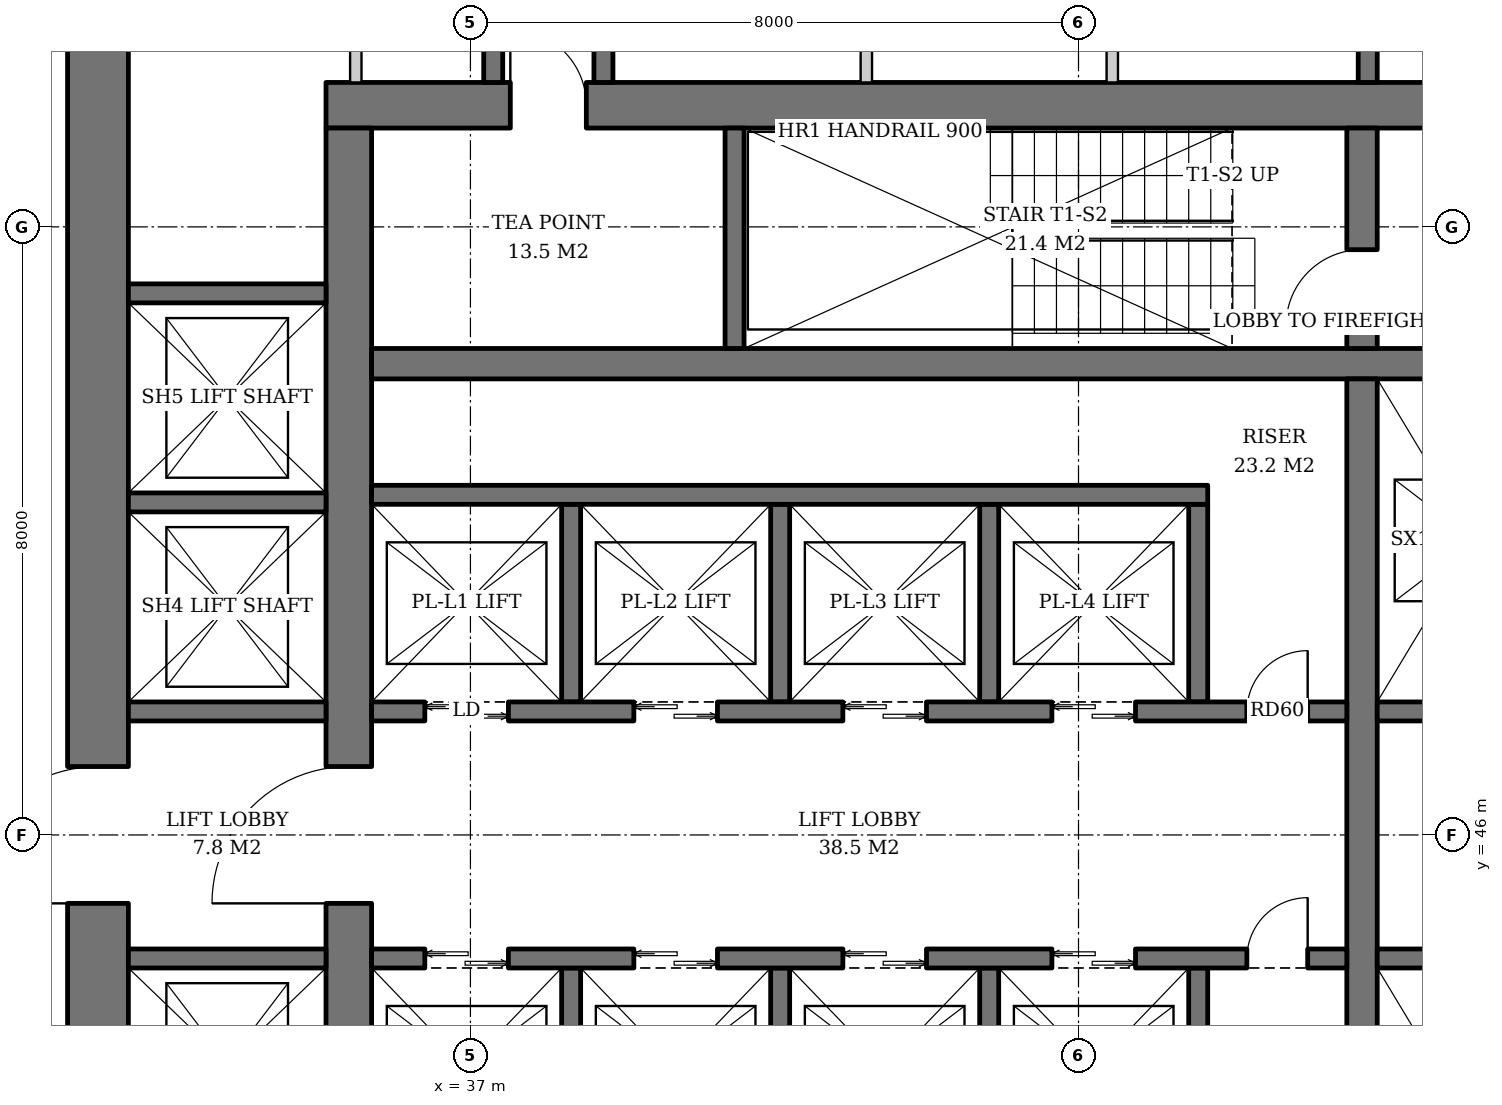
"""IFC4 building model, lengths in metres.
Left out: names, types, materials, properties, quantities, classifications, styles, units other than length and angle.
Written with IfcOpenShell. Run it as: python <this file> out.ifc"""

import sys

from ifc_helpers import new_model, si_unit, direction, frame, frame_2d, origin, place, context, subcontext, project, spatial, rectangle, extrude, element, fill, save


model = new_model("IFC4")
c1 = context("Model", 3, precision=1e-05, world=origin(), true_north=direction((0.0, 1.0)))
c2 = subcontext(c1, "Body", "Model", "MODEL_VIEW")
j1 = project(units=[si_unit("LENGTHUNIT", "METRE"), si_unit("PLANEANGLEUNIT", "RADIAN")], contexts=[c1])
p1 = place(None, origin())
s1 = spatial("IfcSite", under=j1, at=p1, CompositionType="ELEMENT")
p2 = place(p1, origin())
s2 = spatial("IfcBuilding", under=s1, at=p2, CompositionType="ELEMENT")
p3 = place(p2, frame((0.0, 0.0, 51.4)))
s3 = spatial("IfcBuildingStorey", under=s2, at=p3, CompositionType="ELEMENT", Elevation=51.4)
p4 = place(p3, frame((35.1, 55.6, 0.0), z_axis=(0.0, 0.0, 1.0), x_axis=(1.0, 0.0, 0.0)))
e1 = element("IfcWall", 1, at=p4, inside=s3, PredefinedType="SHEAR", context=c2, shape_type="SweptSolid", body=[
    extrude(rectangle(XDim=19.8, YDim=0.6, at=frame_2d((9.9, 0.0))), origin(), (0.0, 0.0, 1.0), 3.8),
])
p5 = place(p4, frame((14.54, 0.0, 0.0)))
e2 = element("IfcOpeningElement", 2, at=p5, cuts=e1, PredefinedType="OPENING", context=c2, shape_type="SweptSolid", body=[
    extrude(rectangle(XDim=1.0, YDim=2.1, at=frame_2d((0.5, 1.05))), frame((0.0, 0.31, 0.0), z_axis=(0.0, -1.0, 0.0), x_axis=(1.0, 0.0, 0.0)), (0.0, 0.0, 1.0), 0.62),
])
p6 = place(p4, frame((2.425, 0.0, 0.0)))
e3 = element("IfcOpeningElement", 3, at=p6, cuts=e1, PredefinedType="OPENING", context=c2, shape_type="SweptSolid", body=[
    extrude(rectangle(XDim=1.0, YDim=2.1, at=frame_2d((0.5, 1.05))), frame((0.0, 0.31, 0.0), z_axis=(0.0, -1.0, 0.0), x_axis=(1.0, 0.0, 0.0)), (0.0, 0.0, 1.0), 0.62),
])
p7 = place(p3, frame((35.4, 36.7, 0.0), z_axis=(0.0, 0.0, 1.0), x_axis=(0.0, 1.0, 0.0)))
e4 = element("IfcWall", 4, at=p7, inside=s3, PredefinedType="SHEAR", context=c2, shape_type="SweptSolid", body=[
    extrude(rectangle(XDim=18.6, YDim=0.6, at=frame_2d((9.3, 0.0))), origin(), (0.0, 0.0, 1.0), 3.8),
])
p8 = place(p7, frame((8.4, 0.0, 0.0)))
e5 = element("IfcOpeningElement", 5, at=p8, cuts=e4, PredefinedType="OPENING", context=c2, shape_type="SweptSolid", body=[
    extrude(rectangle(XDim=1.8, YDim=2.4, at=frame_2d((0.9, 1.2))), frame((0.0, 0.31, 0.0), z_axis=(0.0, -1.0, 0.0), x_axis=(1.0, 0.0, 0.0)), (0.0, 0.0, 1.0), 0.62),
])
p9 = place(p3, frame((32.1, 33.5, 0.0), z_axis=(0.0, 0.0, 1.0), x_axis=(0.0, 1.0, 0.0)))
e6 = element("IfcWall", 6, at=p9, inside=s3, PredefinedType="SHEAR", context=c2, shape_type="SweptSolid", body=[
    extrude(rectangle(XDim=25.0, YDim=0.8, at=frame_2d((12.5, 0.0))), origin(), (0.0, 0.0, 1.0), 3.8),
])
p10 = place(p9, frame((11.6, 0.0, 0.0)))
e7 = element("IfcOpeningElement", 7, at=p10, cuts=e6, PredefinedType="OPENING", context=c2, shape_type="SweptSolid", body=[
    extrude(rectangle(XDim=1.8, YDim=2.4, at=frame_2d((0.9, 1.2))), frame((0.0, 0.41, 0.0), z_axis=(0.0, -1.0, 0.0), x_axis=(1.0, 0.0, 0.0)), (0.0, 0.0, 1.0), 0.82),
])
p11 = place(p3, frame((35.7, 52.2, 0.0), z_axis=(0.0, 0.0, 1.0), x_axis=(1.0, 0.0, 0.0)))
e8 = element("IfcWall", 8, at=p11, inside=s3, PredefinedType="SHEAR", context=c2, shape_type="SweptSolid", body=[
    extrude(rectangle(XDim=18.6, YDim=0.4, at=frame_2d((9.3, 0.0))), origin(), (0.0, 0.0, 1.0), 3.8),
])
p12 = place(p3, frame((48.73, 40.0, 0.0), z_axis=(0.0, 0.0, 1.0), x_axis=(0.0, 1.0, 0.0)))
e9 = element("IfcWall", 9, at=p12, inside=s3, PredefinedType="SHEAR", context=c2, shape_type="SweptSolid", body=[
    extrude(rectangle(XDim=12.0, YDim=0.4, at=frame_2d((6.0, 0.0))), origin(), (0.0, 0.0, 1.0), 3.8),
])
p13 = place(p3, frame((48.73, 52.4, 0.0), z_axis=(0.0, 0.0, 1.0), x_axis=(0.0, 1.0, 0.0)))
e10 = element("IfcWall", 10, at=p13, inside=s3, PredefinedType="SHEAR", context=c2, shape_type="SweptSolid", body=[
    extrude(rectangle(XDim=2.9, YDim=0.4, at=frame_2d((1.45, 0.0))), origin(), (0.0, 0.0, 1.0), 3.8),
])
p14 = place(p13, frame((0.3, 0.0, 0.0)))
e11 = element("IfcOpeningElement", 11, at=p14, cuts=e10, PredefinedType="OPENING", context=c2, shape_type="SweptSolid", body=[
    extrude(rectangle(XDim=1.0, YDim=2.1, at=frame_2d((0.5, 1.05))), frame((0.0, 0.21, 0.0), z_axis=(0.0, -1.0, 0.0), x_axis=(1.0, 0.0, 0.0)), (0.0, 0.0, 1.0), 0.42),
])
p15 = place(p3, frame((40.475, 52.4, 0.0), z_axis=(0.0, 0.0, 1.0), x_axis=(0.0, 1.0, 0.0)))
e12 = element("IfcWall", 12, at=p15, inside=s3, PredefinedType="SHEAR", context=c2, shape_type="SweptSolid", body=[
    extrude(rectangle(XDim=2.9, YDim=0.25, at=frame_2d((1.45, 0.0))), origin(), (0.0, 0.0, 1.0), 3.8),
])
for number, where, z_axis, x_axis in (
    (13, (38.325, 47.75, 0.0), (0.0, 0.0, 1.0), (0.0, 1.0, 0.0)),
    (14, (41.075, 47.75, 0.0), (0.0, 0.0, 1.0), (0.0, 1.0, 0.0)),
    (15, (43.825, 47.75, 0.0), (0.0, 0.0, 1.0), (0.0, 1.0, 0.0)),
    (16, (46.575, 47.75, 0.0), (0.0, 0.0, 1.0), (0.0, 1.0, 0.0)),
):
    element("IfcWall", number, at=place(p3, frame(where, z_axis=z_axis, x_axis=x_axis)), inside=s3, PredefinedType="SHEAR", context=c2, shape_type="SweptSolid", body=[
        extrude(rectangle(XDim=2.6, YDim=0.25, at=frame_2d((1.3, 0.0))), origin(), (0.0, 0.0, 1.0), 3.8),
    ])
p16 = place(p3, frame((35.7, 50.475, 0.0), z_axis=(0.0, 0.0, 1.0), x_axis=(1.0, 0.0, 0.0)))
e17 = element("IfcWall", 17, at=p16, inside=s3, PredefinedType="SHEAR", context=c2, shape_type="SweptSolid", body=[
    extrude(rectangle(XDim=11.0, YDim=0.25, at=frame_2d((5.5, 0.0))), origin(), (0.0, 0.0, 1.0), 3.8),
])
p17 = place(p3, frame((35.7, 47.625, 0.0), z_axis=(0.0, 0.0, 1.0), x_axis=(1.0, 0.0, 0.0)))
e18 = element("IfcWall", 18, at=p17, inside=s3, PredefinedType="SHEAR", context=c2, shape_type="SweptSolid", body=[
    extrude(rectangle(XDim=12.83, YDim=0.25, at=frame_2d((6.415, 0.0))), origin(), (0.0, 0.0, 1.0), 3.8),
])
p18 = place(p17, frame((0.7, 0.0, 0.0)))
e19 = element("IfcOpeningElement", 19, at=p18, cuts=e18, PredefinedType="OPENING", context=c2, shape_type="SweptSolid", body=[
    extrude(rectangle(XDim=1.1, YDim=2.2, at=frame_2d((0.55, 1.1))), frame((0.0, 0.135, 0.0), z_axis=(0.0, -1.0, 0.0), x_axis=(1.0, 0.0, 0.0)), (0.0, 0.0, 1.0), 0.27),
])
p19 = place(p17, frame((3.45, 0.0, 0.0)))
e20 = element("IfcOpeningElement", 20, at=p19, cuts=e18, PredefinedType="OPENING", context=c2, shape_type="SweptSolid", body=[
    extrude(rectangle(XDim=1.1, YDim=2.2, at=frame_2d((0.55, 1.1))), frame((0.0, 0.135, 0.0), z_axis=(0.0, -1.0, 0.0), x_axis=(1.0, 0.0, 0.0)), (0.0, 0.0, 1.0), 0.27),
])
p20 = place(p17, frame((6.2, 0.0, 0.0)))
e21 = element("IfcOpeningElement", 21, at=p20, cuts=e18, PredefinedType="OPENING", context=c2, shape_type="SweptSolid", body=[
    extrude(rectangle(XDim=1.1, YDim=2.2, at=frame_2d((0.55, 1.1))), frame((0.0, 0.135, 0.0), z_axis=(0.0, -1.0, 0.0), x_axis=(1.0, 0.0, 0.0)), (0.0, 0.0, 1.0), 0.27),
])
p21 = place(p17, frame((8.95, 0.0, 0.0)))
e22 = element("IfcOpeningElement", 22, at=p21, cuts=e18, PredefinedType="OPENING", context=c2, shape_type="SweptSolid", body=[
    extrude(rectangle(XDim=1.1, YDim=2.2, at=frame_2d((0.55, 1.1))), frame((0.0, 0.135, 0.0), z_axis=(0.0, -1.0, 0.0), x_axis=(1.0, 0.0, 0.0)), (0.0, 0.0, 1.0), 0.27),
])
p22 = place(p17, frame((11.515, 0.0, 0.0)))
e23 = element("IfcOpeningElement", 23, at=p22, cuts=e18, PredefinedType="OPENING", context=c2, shape_type="SweptSolid", body=[
    extrude(rectangle(XDim=0.8, YDim=2.0, at=frame_2d((0.4, 1.0))), frame((0.0, 0.135, 0.0), z_axis=(0.0, -1.0, 0.0), x_axis=(1.0, 0.0, 0.0)), (0.0, 0.0, 1.0), 0.27),
])
for number, where, z_axis, x_axis in (
    (24, (38.325, 44.25, 0.0), (0.0, 0.0, 1.0), (0.0, -1.0, 0.0)),
    (25, (41.075, 44.25, 0.0), (0.0, 0.0, 1.0), (0.0, -1.0, 0.0)),
    (26, (43.825, 44.25, 0.0), (0.0, 0.0, 1.0), (0.0, -1.0, 0.0)),
    (27, (46.575, 44.25, 0.0), (0.0, 0.0, 1.0), (0.0, -1.0, 0.0)),
):
    element("IfcWall", number, at=place(p3, frame(where, z_axis=z_axis, x_axis=x_axis)), inside=s3, PredefinedType="SHEAR", context=c2, shape_type="SweptSolid", body=[
        extrude(rectangle(XDim=2.6, YDim=0.25, at=frame_2d((1.3, 0.0))), origin(), (0.0, 0.0, 1.0), 3.8),
    ])
p23 = place(p3, frame((35.7, 44.375, 0.0), z_axis=(0.0, 0.0, 1.0), x_axis=(1.0, 0.0, 0.0)))
e28 = element("IfcWall", 28, at=p23, inside=s3, PredefinedType="SHEAR", context=c2, shape_type="SweptSolid", body=[
    extrude(rectangle(XDim=12.83, YDim=0.25, at=frame_2d((6.415, 0.0))), origin(), (0.0, 0.0, 1.0), 3.8),
])
p24 = place(p23, frame((0.7, 0.0, 0.0)))
e29 = element("IfcOpeningElement", 29, at=p24, cuts=e28, PredefinedType="OPENING", context=c2, shape_type="SweptSolid", body=[
    extrude(rectangle(XDim=1.1, YDim=2.2, at=frame_2d((0.55, 1.1))), frame((0.0, 0.135, 0.0), z_axis=(0.0, -1.0, 0.0), x_axis=(1.0, 0.0, 0.0)), (0.0, 0.0, 1.0), 0.27),
])
p25 = place(p23, frame((3.45, 0.0, 0.0)))
e30 = element("IfcOpeningElement", 30, at=p25, cuts=e28, PredefinedType="OPENING", context=c2, shape_type="SweptSolid", body=[
    extrude(rectangle(XDim=1.1, YDim=2.2, at=frame_2d((0.55, 1.1))), frame((0.0, 0.135, 0.0), z_axis=(0.0, -1.0, 0.0), x_axis=(1.0, 0.0, 0.0)), (0.0, 0.0, 1.0), 0.27),
])
p26 = place(p23, frame((6.2, 0.0, 0.0)))
e31 = element("IfcOpeningElement", 31, at=p26, cuts=e28, PredefinedType="OPENING", context=c2, shape_type="SweptSolid", body=[
    extrude(rectangle(XDim=1.1, YDim=2.2, at=frame_2d((0.55, 1.1))), frame((0.0, 0.135, 0.0), z_axis=(0.0, -1.0, 0.0), x_axis=(1.0, 0.0, 0.0)), (0.0, 0.0, 1.0), 0.27),
])
p27 = place(p23, frame((8.95, 0.0, 0.0)))
e32 = element("IfcOpeningElement", 32, at=p27, cuts=e28, PredefinedType="OPENING", context=c2, shape_type="SweptSolid", body=[
    extrude(rectangle(XDim=1.1, YDim=2.2, at=frame_2d((0.55, 1.1))), frame((0.0, 0.135, 0.0), z_axis=(0.0, -1.0, 0.0), x_axis=(1.0, 0.0, 0.0)), (0.0, 0.0, 1.0), 0.27),
])
p28 = place(p23, frame((11.515, 0.0, 0.0)))
e33 = element("IfcOpeningElement", 33, at=p28, cuts=e28, PredefinedType="OPENING", context=c2, shape_type="SweptSolid", body=[
    extrude(rectangle(XDim=0.8, YDim=2.0, at=frame_2d((0.4, 1.0))), frame((0.0, 0.135, 0.0), z_axis=(0.0, -1.0, 0.0), x_axis=(1.0, 0.0, 0.0)), (0.0, 0.0, 1.0), 0.27),
])
for number, where, z_axis, x_axis in (
    (34, (48.93, 47.625, 0.0), (0.0, 0.0, 1.0), (1.0, 0.0, 0.0)),
    (35, (48.93, 44.375, 0.0), (0.0, 0.0, 1.0), (1.0, 0.0, 0.0)),
):
    element("IfcWall", number, at=place(p3, frame(where, z_axis=z_axis, x_axis=x_axis)), inside=s3, PredefinedType="SHEAR", context=c2, shape_type="SweptSolid", body=[
        extrude(rectangle(XDim=5.37, YDim=0.25, at=frame_2d((2.685, 0.0))), origin(), (0.0, 0.0, 1.0), 3.8),
    ])
for number, where, z_axis, x_axis in (
    (36, (32.5, 44.375, 0.0), (0.0, 0.0, 1.0), (1.0, 0.0, 0.0)),
    (37, (32.5, 47.625, 0.0), (0.0, 0.0, 1.0), (1.0, 0.0, 0.0)),
    (38, (32.5, 50.375, 0.0), (0.0, 0.0, 1.0), (1.0, 0.0, 0.0)),
    (39, (32.5, 53.125, 0.0), (0.0, 0.0, 1.0), (1.0, 0.0, 0.0)),
):
    element("IfcWall", number, at=place(p3, frame(where, z_axis=z_axis, x_axis=x_axis)), inside=s3, PredefinedType="SHEAR", context=c2, shape_type="SweptSolid", body=[
        extrude(rectangle(XDim=2.6, YDim=0.25, at=frame_2d((1.3, 0.0))), origin(), (0.0, 0.0, 1.0), 3.8),
    ])
for number, where, z_axis, x_axis in (
    (40, (48.805, 55.9, 0.0), (0.0, 0.0, 1.0), (0.0, 1.0, 0.0)),
    (41, (37.3, 55.9, 0.0), (0.0, 0.0, 1.0), (0.0, 1.0, 0.0)),
    (42, (38.75, 55.9, 0.0), (0.0, 0.0, 1.0), (0.0, 1.0, 0.0)),
):
    element("IfcWall", number, at=place(p3, frame(where, z_axis=z_axis, x_axis=x_axis)), inside=s3, PredefinedType="SOLIDWALL", context=c2, shape_type="SweptSolid", body=[
        extrude(rectangle(XDim=2.6, YDim=0.25, at=frame_2d((1.3, 0.0))), origin(), (0.0, 0.0, 1.0), 3.62),
    ])
for number, where, z_axis, x_axis in (
    (43, (35.492, 55.9, 0.0), (0.0, 0.0, 1.0), (0.0, 1.0, 0.0)),
    (44, (42.209, 55.9, 0.0), (0.0, 0.0, 1.0), (0.0, 1.0, 0.0)),
    (45, (45.444, 55.9, 0.0), (0.0, 0.0, 1.0), (0.0, 1.0, 0.0)),
):
    element("IfcWall", number, at=place(p3, frame(where, z_axis=z_axis, x_axis=x_axis)), inside=s3, PredefinedType="SOLIDWALL", context=c2, shape_type="SweptSolid", body=[
        extrude(rectangle(XDim=2.6, YDim=0.15, at=frame_2d((1.3, 0.0))), origin(), (0.0, 0.0, 1.0), 3.62),
    ])
p29 = place(p18, origin())
e46 = element("IfcDoor", 46, at=p29, inside=s3, OperationType="DOUBLE_DOOR_SLIDING", PredefinedType="DOOR", context=c2, shape_type="SweptSolid", body=[
    extrude(rectangle(XDim=1.1, YDim=2.2, at=frame_2d((0.55, 1.1))), frame((0.0, 0.025, 0.0), z_axis=(0.0, -1.0, 0.0), x_axis=(1.0, 0.0, 0.0)), (0.0, 0.0, 1.0), 0.05),
])
fill(e19, e46)
p30 = place(p19, origin())
e47 = element("IfcDoor", 47, at=p30, inside=s3, OperationType="DOUBLE_DOOR_SLIDING", PredefinedType="DOOR", context=c2, shape_type="SweptSolid", body=[
    extrude(rectangle(XDim=1.1, YDim=2.2, at=frame_2d((0.55, 1.1))), frame((0.0, 0.025, 0.0), z_axis=(0.0, -1.0, 0.0), x_axis=(1.0, 0.0, 0.0)), (0.0, 0.0, 1.0), 0.05),
])
fill(e20, e47)
p31 = place(p20, origin())
e48 = element("IfcDoor", 48, at=p31, inside=s3, OperationType="DOUBLE_DOOR_SLIDING", PredefinedType="DOOR", context=c2, shape_type="SweptSolid", body=[
    extrude(rectangle(XDim=1.1, YDim=2.2, at=frame_2d((0.55, 1.1))), frame((0.0, 0.025, 0.0), z_axis=(0.0, -1.0, 0.0), x_axis=(1.0, 0.0, 0.0)), (0.0, 0.0, 1.0), 0.05),
])
fill(e21, e48)
p32 = place(p21, origin())
e49 = element("IfcDoor", 49, at=p32, inside=s3, OperationType="DOUBLE_DOOR_SLIDING", PredefinedType="DOOR", context=c2, shape_type="SweptSolid", body=[
    extrude(rectangle(XDim=1.1, YDim=2.2, at=frame_2d((0.55, 1.1))), frame((0.0, 0.025, 0.0), z_axis=(0.0, -1.0, 0.0), x_axis=(1.0, 0.0, 0.0)), (0.0, 0.0, 1.0), 0.05),
])
fill(e22, e49)
p33 = place(p22, origin())
e50 = element("IfcDoor", 50, at=p33, inside=s3, OperationType="SINGLE_SWING_RIGHT", PredefinedType="DOOR", context=c2, shape_type="SweptSolid", body=[
    extrude(rectangle(XDim=0.8, YDim=2.0, at=frame_2d((0.4, 1.0))), frame((0.0, 0.025, 0.0), z_axis=(0.0, -1.0, 0.0), x_axis=(1.0, 0.0, 0.0)), (0.0, 0.0, 1.0), 0.05),
])
fill(e23, e50)
p34 = place(p24, origin())
e51 = element("IfcDoor", 51, at=p34, inside=s3, OperationType="DOUBLE_DOOR_SLIDING", PredefinedType="DOOR", context=c2, shape_type="SweptSolid", body=[
    extrude(rectangle(XDim=1.1, YDim=2.2, at=frame_2d((0.55, 1.1))), frame((0.0, 0.025, 0.0), z_axis=(0.0, -1.0, 0.0), x_axis=(1.0, 0.0, 0.0)), (0.0, 0.0, 1.0), 0.05),
])
fill(e29, e51)
p35 = place(p25, origin())
e52 = element("IfcDoor", 52, at=p35, inside=s3, OperationType="DOUBLE_DOOR_SLIDING", PredefinedType="DOOR", context=c2, shape_type="SweptSolid", body=[
    extrude(rectangle(XDim=1.1, YDim=2.2, at=frame_2d((0.55, 1.1))), frame((0.0, 0.025, 0.0), z_axis=(0.0, -1.0, 0.0), x_axis=(1.0, 0.0, 0.0)), (0.0, 0.0, 1.0), 0.05),
])
fill(e30, e52)
p36 = place(p26, origin())
e53 = element("IfcDoor", 53, at=p36, inside=s3, OperationType="DOUBLE_DOOR_SLIDING", PredefinedType="DOOR", context=c2, shape_type="SweptSolid", body=[
    extrude(rectangle(XDim=1.1, YDim=2.2, at=frame_2d((0.55, 1.1))), frame((0.0, 0.025, 0.0), z_axis=(0.0, -1.0, 0.0), x_axis=(1.0, 0.0, 0.0)), (0.0, 0.0, 1.0), 0.05),
])
fill(e31, e53)
p37 = place(p27, origin())
e54 = element("IfcDoor", 54, at=p37, inside=s3, OperationType="DOUBLE_DOOR_SLIDING", PredefinedType="DOOR", context=c2, shape_type="SweptSolid", body=[
    extrude(rectangle(XDim=1.1, YDim=2.2, at=frame_2d((0.55, 1.1))), frame((0.0, 0.025, 0.0), z_axis=(0.0, -1.0, 0.0), x_axis=(1.0, 0.0, 0.0)), (0.0, 0.0, 1.0), 0.05),
])
fill(e32, e54)
p38 = place(p28, origin())
e55 = element("IfcDoor", 55, at=p38, inside=s3, OperationType="SINGLE_SWING_RIGHT", PredefinedType="DOOR", context=c2, shape_type="SweptSolid", body=[
    extrude(rectangle(XDim=0.8, YDim=2.0, at=frame_2d((0.4, 1.0))), frame((0.0, 0.025, 0.0), z_axis=(0.0, -1.0, 0.0), x_axis=(1.0, 0.0, 0.0)), (0.0, 0.0, 1.0), 0.05),
])
fill(e33, e55)
p39 = place(p14, origin())
e56 = element("IfcDoor", 56, at=p39, inside=s3, OperationType="SINGLE_SWING_LEFT", PredefinedType="DOOR", context=c2, shape_type="SweptSolid", body=[
    extrude(rectangle(XDim=1.0, YDim=2.1, at=frame_2d((0.5, 1.05))), frame((0.0, 0.025, 0.0), z_axis=(0.0, -1.0, 0.0), x_axis=(1.0, 0.0, 0.0)), (0.0, 0.0, 1.0), 0.05),
])
fill(e11, e56)
p40 = place(p8, origin())
e57 = element("IfcDoor", 57, at=p40, inside=s3, OperationType="DOUBLE_DOOR_SINGLE_SWING", PredefinedType="DOOR", context=c2, shape_type="SweptSolid", body=[
    extrude(rectangle(XDim=1.8, YDim=2.4, at=frame_2d((0.9, 1.2))), frame((0.0, 0.025, 0.0), z_axis=(0.0, -1.0, 0.0), x_axis=(1.0, 0.0, 0.0)), (0.0, 0.0, 1.0), 0.05),
])
fill(e5, e57)
p41 = place(p10, origin())
e58 = element("IfcDoor", 58, at=p41, inside=s3, OperationType="DOUBLE_DOOR_SINGLE_SWING", PredefinedType="DOOR", context=c2, shape_type="SweptSolid", body=[
    extrude(rectangle(XDim=1.8, YDim=2.4, at=frame_2d((0.9, 1.2))), frame((0.0, 0.025, 0.0), z_axis=(0.0, -1.0, 0.0), x_axis=(1.0, 0.0, 0.0)), (0.0, 0.0, 1.0), 0.05),
])
fill(e7, e58)
p42 = place(p6, origin())
e59 = element("IfcDoor", 59, at=p42, inside=s3, OperationType="SINGLE_SWING_LEFT", PredefinedType="DOOR", context=c2, shape_type="SweptSolid", body=[
    extrude(rectangle(XDim=1.0, YDim=2.1, at=frame_2d((0.5, 1.05))), frame((0.0, -0.24, 0.0), z_axis=(0.0, -1.0, 0.0), x_axis=(1.0, 0.0, 0.0)), (0.0, 0.0, 1.0), 0.05),
])
fill(e3, e59)
save(model, sys.argv[1])
